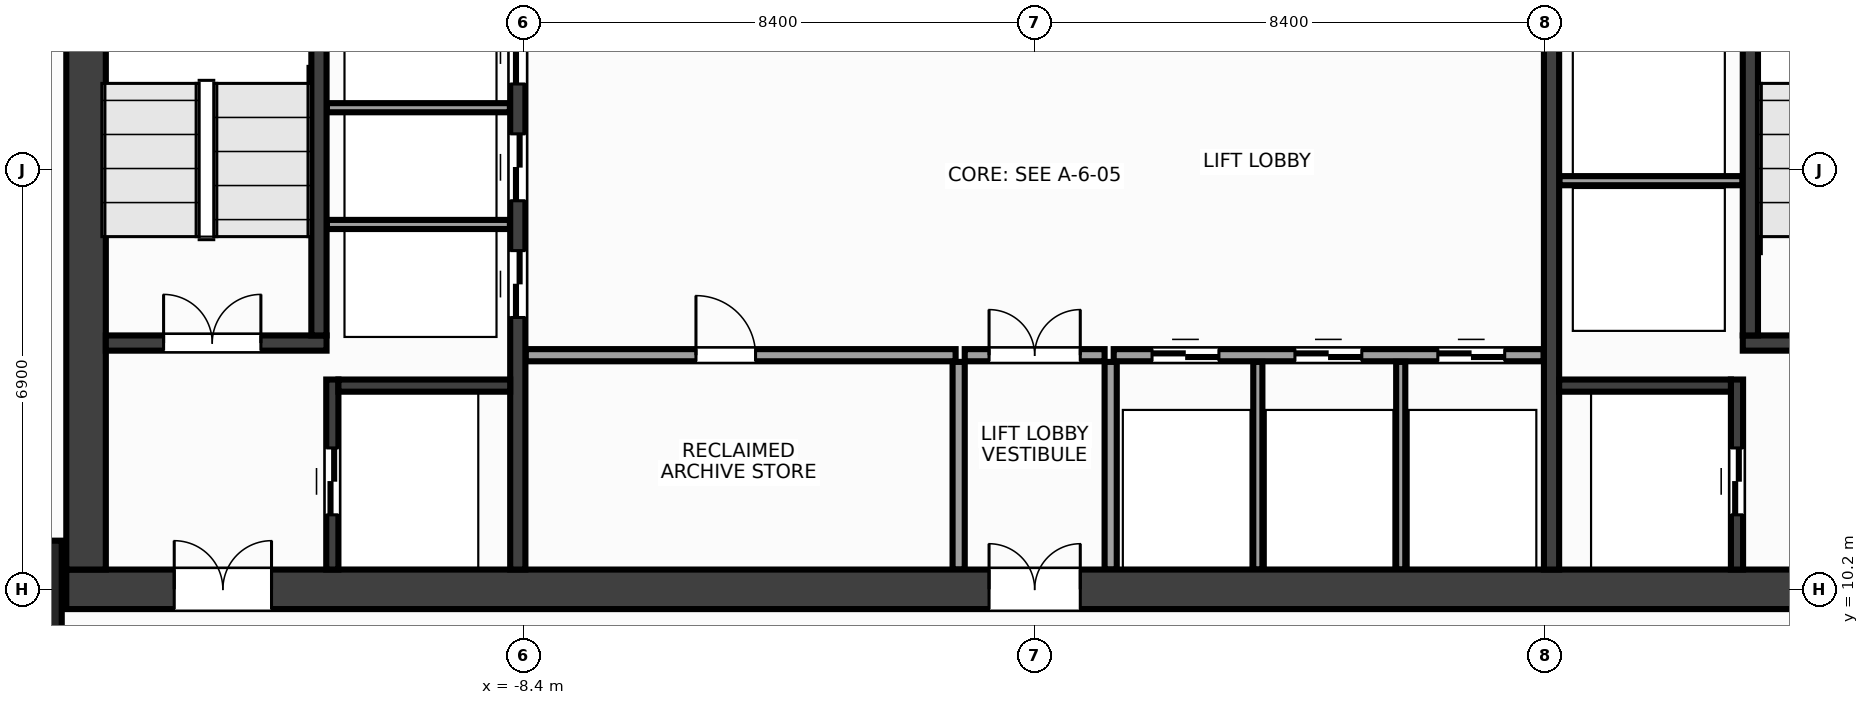
"""IFC4 building model, lengths in metres.
Left out: names, types, materials, properties, quantities, classifications, styles, units other than length and angle.
Written with IfcOpenShell. Run it as: python <this file> out.ifc"""

import sys

from ifc_helpers import new_model, si_unit, direction, frame, frame_2d, origin, origin_2d, place, context, subcontext, project, spatial, rectangle, extrude, source, transform, mapped, element, fill, save


model = new_model("IFC4")
c1 = context("Model", 3, precision=1e-05, world=origin(), true_north=direction((0.0, 1.0)))
c2 = subcontext(c1, "Body", "Model", "MODEL_VIEW")
j1 = project(units=[si_unit("LENGTHUNIT", "METRE"), si_unit("PLANEANGLEUNIT", "RADIAN")], contexts=[c1])
p1 = place(None, origin())
s1 = spatial("IfcSite", under=j1, at=p1, CompositionType="ELEMENT")
p2 = place(p1, origin())
s2 = spatial("IfcBuilding", under=s1, at=p2, CompositionType="ELEMENT")
p3 = place(p2, frame((0.0, 0.0, 153.2)))
s3 = spatial("IfcBuildingStorey", under=s2, at=p3, CompositionType="ELEMENT", Elevation=153.2)
m1 = source(origin(), c2, "Body", "SweptSolid", [
    extrude(rectangle(XDim=31.85, YDim=0.65, at=frame_2d((15.925, 0.0))), origin(), (0.0, 0.0, 1.0), 3.6),
])
p4 = place(p3, frame((-15.925, 10.2, 0.0), z_axis=(0.0, 0.0, 1.0), x_axis=(1.0, 0.0, 0.0)))
e1 = element("IfcWall", 1, at=p4, inside=s3, PredefinedType="SHEAR", context=c2, shape_type="MappedRepresentation", body=[
    mapped(m1, transform((0.0, 0.0, 0.0), x_axis=(1.0, 0.0, 0.0), y_axis=(0.0, 1.0, 0.0), z_axis=(0.0, 0.0, 1.0), scale=1.0)),
])
p5 = place(p4, frame((1.775, 0.0, 0.0)))
e2 = element("IfcOpeningElement", 2, at=p5, cuts=e1, PredefinedType="OPENING", context=c2, shape_type="SweptSolid", body=[
    extrude(rectangle(XDim=1.6, YDim=2.15, at=frame_2d((0.8, 1.075))), frame((0.0, 0.337, 0.0), z_axis=(0.0, -1.0, 0.0), x_axis=(1.0, 0.0, 0.0)), (0.0, 0.0, 1.0), 0.674),
])
p6 = place(p4, frame((28.475, 0.0, 0.0)))
e3 = element("IfcOpeningElement", 3, at=p6, cuts=e1, PredefinedType="OPENING", context=c2, shape_type="SweptSolid", body=[
    extrude(rectangle(XDim=1.6, YDim=2.15, at=frame_2d((0.8, 1.075))), frame((0.0, 0.337, 0.0), z_axis=(0.0, -1.0, 0.0), x_axis=(1.0, 0.0, 0.0)), (0.0, 0.0, 1.0), 0.674),
])
p7 = place(p4, frame((15.175, 0.0, 0.0)))
e4 = element("IfcOpeningElement", 4, at=p7, cuts=e1, PredefinedType="OPENING", context=c2, shape_type="SweptSolid", body=[
    extrude(rectangle(XDim=1.5, YDim=2.2, at=frame_2d((0.75, 1.1))), frame((0.0, 0.337, 0.0), z_axis=(0.0, -1.0, 0.0), x_axis=(1.0, 0.0, 0.0)), (0.0, 0.0, 1.0), 0.674),
])
m2 = source(origin(), c2, "Body", "SweptSolid", [
    extrude(rectangle(XDim=12.95, YDim=0.65, at=frame_2d((6.475, 0.0))), origin(), (0.0, 0.0, 1.0), 3.6),
])
p8 = place(p3, frame((-15.6, 10.525, 0.0), z_axis=(0.0, 0.0, 1.0), x_axis=(0.0, 1.0, 0.0)))
e5 = element("IfcWall", 5, at=p8, inside=s3, PredefinedType="SHEAR", context=c2, shape_type="MappedRepresentation", body=[
    mapped(m2, transform((0.0, 0.0, 0.0), x_axis=(1.0, 0.0, 0.0), y_axis=(0.0, 1.0, 0.0), z_axis=(0.0, 0.0, 1.0), scale=1.0)),
])
m3 = source(origin(), c2, "Body", "SweptSolid", [
    extrude(rectangle(XDim=12.95, YDim=0.25, at=frame_2d((6.475, 0.0))), origin(), (0.0, 0.0, 1.0), 3.6),
])
p9 = place(p3, frame((-8.5, 10.525, 0.0), z_axis=(0.0, 0.0, 1.0), x_axis=(0.0, 1.0, 0.0)))
e6 = element("IfcWall", 6, at=p9, inside=s3, PredefinedType="SHEAR", context=c2, shape_type="MappedRepresentation", body=[
    mapped(m3, transform((0.0, 0.0, 0.0), x_axis=(1.0, 0.0, 0.0), y_axis=(0.0, 1.0, 0.0), z_axis=(0.0, 0.0, 1.0), scale=1.0)),
])
p10 = place(p9, frame((4.145, 0.0, 0.0)))
e7 = element("IfcOpeningElement", 7, at=p10, cuts=e6, PredefinedType="OPENING", context=c2, shape_type="SweptSolid", body=[
    extrude(rectangle(XDim=1.1, YDim=2.15, at=frame_2d((0.55, 1.075))), frame((0.0, 0.137, 0.0), z_axis=(0.0, -1.0, 0.0), x_axis=(1.0, 0.0, 0.0)), (0.0, 0.0, 1.0), 0.274),
])
p11 = place(p9, frame((6.065, 0.0, 0.0)))
e8 = element("IfcOpeningElement", 8, at=p11, cuts=e6, PredefinedType="OPENING", context=c2, shape_type="SweptSolid", body=[
    extrude(rectangle(XDim=1.1, YDim=2.15, at=frame_2d((0.55, 1.075))), frame((0.0, 0.137, 0.0), z_axis=(0.0, -1.0, 0.0), x_axis=(1.0, 0.0, 0.0)), (0.0, 0.0, 1.0), 0.274),
])
p12 = place(p9, frame((7.985, 0.0, 0.0)))
e9 = element("IfcOpeningElement", 9, at=p12, cuts=e6, PredefinedType="OPENING", context=c2, shape_type="SweptSolid", body=[
    extrude(rectangle(XDim=1.1, YDim=2.15, at=frame_2d((0.55, 1.075))), frame((0.0, 0.137, 0.0), z_axis=(0.0, -1.0, 0.0), x_axis=(1.0, 0.0, 0.0)), (0.0, 0.0, 1.0), 0.274),
])
p13 = place(p3, frame((8.5, 10.525, 0.0), z_axis=(0.0, 0.0, 1.0), x_axis=(0.0, 1.0, 0.0)))
e10 = element("IfcWall", 10, at=p13, inside=s3, PredefinedType="SHEAR", context=c2, shape_type="MappedRepresentation", body=[
    mapped(m3, transform((0.0, 0.0, 0.0), x_axis=(1.0, 0.0, 0.0), y_axis=(0.0, 1.0, 0.0), z_axis=(0.0, 0.0, 1.0), scale=1.0)),
])
p14 = place(p13, frame((9.925, 0.0, 0.0)))
e11 = element("IfcOpeningElement", 11, at=p14, cuts=e10, PredefinedType="OPENING", context=c2, shape_type="SweptSolid", body=[
    extrude(rectangle(XDim=0.95, YDim=2.15, at=frame_2d((0.475, 1.075))), frame((0.0, 0.137, 0.0), z_axis=(0.0, -1.0, 0.0), x_axis=(1.0, 0.0, 0.0)), (0.0, 0.0, 1.0), 0.274),
])
m4 = source(origin(), c2, "Body", "SweptSolid", [
    extrude(rectangle(XDim=3.63, YDim=0.25, at=frame_2d((1.815, 0.0))), origin(), (0.0, 0.0, 1.0), 3.6),
])
p15 = place(p3, frame((-15.275, 14.25, 0.0), z_axis=(0.0, 0.0, 1.0), x_axis=(1.0, 0.0, 0.0)))
e12 = element("IfcWall", 12, at=p15, inside=s3, PredefinedType="SHEAR", context=c2, shape_type="MappedRepresentation", body=[
    mapped(m4, transform((0.0, 0.0, 0.0), x_axis=(1.0, 0.0, 0.0), y_axis=(0.0, 1.0, 0.0), z_axis=(0.0, 0.0, 1.0), scale=1.0)),
])
p16 = place(p15, frame((0.95, 0.0, 0.0)))
e13 = element("IfcOpeningElement", 13, at=p16, cuts=e12, PredefinedType="OPENING", context=c2, shape_type="SweptSolid", body=[
    extrude(rectangle(XDim=1.6, YDim=2.15, at=frame_2d((0.8, 1.075))), frame((0.0, 0.137, 0.0), z_axis=(0.0, -1.0, 0.0), x_axis=(1.0, 0.0, 0.0)), (0.0, 0.0, 1.0), 0.274),
])
m5 = source(origin(), c2, "Body", "SweptSolid", [
    extrude(rectangle(XDim=9.1, YDim=0.25, at=frame_2d((4.55, 0.0))), origin(), (0.0, 0.0, 1.0), 3.6),
])
p17 = place(p3, frame((-11.77, 14.375, 0.0), z_axis=(0.0, 0.0, 1.0), x_axis=(0.0, 1.0, 0.0)))
e14 = element("IfcWall", 14, at=p17, inside=s3, PredefinedType="SHEAR", context=c2, shape_type="MappedRepresentation", body=[
    mapped(m5, transform((0.0, 0.0, 0.0), x_axis=(1.0, 0.0, 0.0), y_axis=(0.0, 1.0, 0.0), z_axis=(0.0, 0.0, 1.0), scale=1.0)),
])
p18 = place(p3, frame((11.645, 14.25, 0.0), z_axis=(0.0, 0.0, 1.0), x_axis=(1.0, 0.0, 0.0)))
e15 = element("IfcWall", 15, at=p18, inside=s3, PredefinedType="SHEAR", context=c2, shape_type="MappedRepresentation", body=[
    mapped(m4, transform((0.0, 0.0, 0.0), x_axis=(1.0, 0.0, 0.0), y_axis=(0.0, 1.0, 0.0), z_axis=(0.0, 0.0, 1.0), scale=1.0)),
])
p19 = place(p18, frame((0.95, 0.0, 0.0)))
e16 = element("IfcOpeningElement", 16, at=p19, cuts=e15, PredefinedType="OPENING", context=c2, shape_type="SweptSolid", body=[
    extrude(rectangle(XDim=1.6, YDim=2.15, at=frame_2d((0.8, 1.075))), frame((0.0, 0.137, 0.0), z_axis=(0.0, -1.0, 0.0), x_axis=(1.0, 0.0, 0.0)), (0.0, 0.0, 1.0), 0.274),
])
p20 = place(p3, frame((11.77, 14.375, 0.0), z_axis=(0.0, 0.0, 1.0), x_axis=(0.0, 1.0, 0.0)))
e17 = element("IfcWall", 17, at=p20, inside=s3, PredefinedType="SHEAR", context=c2, shape_type="MappedRepresentation", body=[
    mapped(m5, transform((0.0, 0.0, 0.0), x_axis=(1.0, 0.0, 0.0), y_axis=(0.0, 1.0, 0.0), z_axis=(0.0, 0.0, 1.0), scale=1.0)),
])
m6 = source(origin(), c2, "Body", "SweptSolid", [
    extrude(rectangle(XDim=3.125, YDim=0.2, at=frame_2d((1.562, 0.0))), origin(), (0.0, 0.0, 1.0), 3.6),
])
p21 = place(p3, frame((-11.55, 10.525, 0.0), z_axis=(0.0, 0.0, 1.0), x_axis=(0.0, 1.0, 0.0)))
e18 = element("IfcWall", 18, at=p21, inside=s3, PredefinedType="SHEAR", context=c2, shape_type="MappedRepresentation", body=[
    mapped(m6, transform((0.0, 0.0, 0.0), x_axis=(1.0, 0.0, 0.0), y_axis=(0.0, 1.0, 0.0), z_axis=(0.0, 0.0, 1.0), scale=1.0)),
])
p22 = place(p21, frame((0.9, 0.0, 0.0)))
e19 = element("IfcOpeningElement", 19, at=p22, cuts=e18, PredefinedType="OPENING", context=c2, shape_type="SweptSolid", body=[
    extrude(rectangle(XDim=1.1, YDim=2.15, at=frame_2d((0.55, 1.075))), frame((0.0, 0.112, 0.0), z_axis=(0.0, -1.0, 0.0), x_axis=(1.0, 0.0, 0.0)), (0.0, 0.0, 1.0), 0.224),
])
m7 = source(origin(), c2, "Body", "SweptSolid", [
    extrude(rectangle(XDim=2.825, YDim=0.2, at=frame_2d((1.413, 0.0))), origin(), (0.0, 0.0, 1.0), 3.6),
])
p23 = place(p3, frame((-11.45, 13.55, 0.0), z_axis=(0.0, 0.0, 1.0), x_axis=(1.0, 0.0, 0.0)))
e20 = element("IfcWall", 20, at=p23, inside=s3, PredefinedType="SHEAR", context=c2, shape_type="MappedRepresentation", body=[
    mapped(m7, transform((0.0, 0.0, 0.0), x_axis=(1.0, 0.0, 0.0), y_axis=(0.0, 1.0, 0.0), z_axis=(0.0, 0.0, 1.0), scale=1.0)),
])
p24 = place(p3, frame((11.55, 10.525, 0.0), z_axis=(0.0, 0.0, 1.0), x_axis=(0.0, 1.0, 0.0)))
e21 = element("IfcWall", 21, at=p24, inside=s3, PredefinedType="SHEAR", context=c2, shape_type="MappedRepresentation", body=[
    mapped(m6, transform((0.0, 0.0, 0.0), x_axis=(1.0, 0.0, 0.0), y_axis=(0.0, 1.0, 0.0), z_axis=(0.0, 0.0, 1.0), scale=1.0)),
])
p25 = place(p24, frame((0.9, 0.0, 0.0)))
e22 = element("IfcOpeningElement", 22, at=p25, cuts=e21, PredefinedType="OPENING", context=c2, shape_type="SweptSolid", body=[
    extrude(rectangle(XDim=1.1, YDim=2.15, at=frame_2d((0.55, 1.075))), frame((0.0, 0.112, 0.0), z_axis=(0.0, -1.0, 0.0), x_axis=(1.0, 0.0, 0.0)), (0.0, 0.0, 1.0), 0.224),
])
p26 = place(p3, frame((8.625, 13.55, 0.0), z_axis=(0.0, 0.0, 1.0), x_axis=(1.0, 0.0, 0.0)))
e23 = element("IfcWall", 23, at=p26, inside=s3, PredefinedType="SHEAR", context=c2, shape_type="MappedRepresentation", body=[
    mapped(m7, transform((0.0, 0.0, 0.0), x_axis=(1.0, 0.0, 0.0), y_axis=(0.0, 1.0, 0.0), z_axis=(0.0, 0.0, 1.0), scale=1.0)),
])
m8 = source(origin(), c2, "Body", "SweptSolid", [
    extrude(rectangle(XDim=1.6, YDim=1.6, at=origin_2d()), origin(), (0.0, 0.0, 1.0), 3.6),
])
p27 = place(p3, frame((-16.8, 10.2, 0.0), z_axis=(0.0, 0.0, 1.0), x_axis=(1.0, 0.0, 0.0)))
e24 = element("IfcColumn", 24, at=p27, inside=s3, PredefinedType="COLUMN", context=c2, shape_type="MappedRepresentation", body=[
    mapped(m8, transform((0.0, 0.0, 0.0), x_axis=(1.0, 0.0, 0.0), y_axis=(0.0, 1.0, 0.0), z_axis=(0.0, 0.0, 1.0), scale=1.0)),
])
m9 = source(origin(), c2, "Body", "SweptSolid", [
    extrude(rectangle(XDim=3.01, YDim=0.15, at=frame_2d((1.505, 0.0))), origin(), (0.0, 0.0, 1.0), 3.38),
])
for number, where, z_axis, x_axis in (
    (25, (-11.64, 16.2, 0.0), (0.0, 0.0, 1.0), (1.0, 0.0, 0.0)),
    (26, (-11.64, 18.12, 0.0), (0.0, 0.0, 1.0), (1.0, 0.0, 0.0)),
    (27, (8.63, 16.92, 0.0), (0.0, 0.0, 1.0), (1.0, 0.0, 0.0)),
):
    element("IfcWall", number, at=place(p3, frame(where, z_axis=z_axis, x_axis=x_axis)), inside=s3, PredefinedType="PARTITIONING", context=c2, shape_type="MappedRepresentation", body=[
        mapped(m9, transform((0.0, 0.0, 0.0), x_axis=(1.0, 0.0, 0.0), y_axis=(0.0, 1.0, 0.0), z_axis=(0.0, 0.0, 1.0), scale=1.0)),
    ])
m10 = source(origin(), c2, "Body", "SweptSolid", [
    extrude(rectangle(XDim=7.07, YDim=0.2, at=frame_2d((3.535, 0.0))), origin(), (0.0, 0.0, 1.0), 3.38),
])
p28 = place(p3, frame((-8.37, 14.05, 0.0), z_axis=(0.0, 0.0, 1.0), x_axis=(1.0, 0.0, 0.0)))
e28 = element("IfcWall", 28, at=p28, inside=s3, PredefinedType="PARTITIONING", context=c2, shape_type="MappedRepresentation", body=[
    mapped(m10, transform((0.0, 0.0, 0.0), x_axis=(1.0, 0.0, 0.0), y_axis=(0.0, 1.0, 0.0), z_axis=(0.0, 0.0, 1.0), scale=1.0)),
])
p29 = place(p28, frame((2.8, 0.0, 0.0)))
e29 = element("IfcOpeningElement", 29, at=p29, cuts=e28, PredefinedType="OPENING", context=c2, shape_type="SweptSolid", body=[
    extrude(rectangle(XDim=0.98, YDim=2.15, at=frame_2d((0.49, 1.075))), frame((0.0, 0.112, 0.0), z_axis=(0.0, -1.0, 0.0), x_axis=(1.0, 0.0, 0.0)), (0.0, 0.0, 1.0), 0.224),
])
p30 = place(p3, frame((1.3, 14.05, 0.0), z_axis=(0.0, 0.0, 1.0), x_axis=(1.0, 0.0, 0.0)))
e30 = element("IfcWall", 30, at=p30, inside=s3, PredefinedType="PARTITIONING", context=c2, shape_type="MappedRepresentation", body=[
    mapped(m10, transform((0.0, 0.0, 0.0), x_axis=(1.0, 0.0, 0.0), y_axis=(0.0, 1.0, 0.0), z_axis=(0.0, 0.0, 1.0), scale=1.0)),
])
p31 = place(p30, frame((0.63, 0.0, 0.0)))
e31 = element("IfcOpeningElement", 31, at=p31, cuts=e30, PredefinedType="OPENING", context=c2, shape_type="SweptSolid", body=[
    extrude(rectangle(XDim=1.1, YDim=2.15, at=frame_2d((0.55, 1.075))), frame((0.0, 0.112, 0.0), z_axis=(0.0, -1.0, 0.0), x_axis=(1.0, 0.0, 0.0)), (0.0, 0.0, 1.0), 0.224),
])
p32 = place(p30, frame((2.98, 0.0, 0.0)))
e32 = element("IfcOpeningElement", 32, at=p32, cuts=e30, PredefinedType="OPENING", context=c2, shape_type="SweptSolid", body=[
    extrude(rectangle(XDim=1.1, YDim=2.15, at=frame_2d((0.55, 1.075))), frame((0.0, 0.112, 0.0), z_axis=(0.0, -1.0, 0.0), x_axis=(1.0, 0.0, 0.0)), (0.0, 0.0, 1.0), 0.224),
])
p33 = place(p30, frame((5.33, 0.0, 0.0)))
e33 = element("IfcOpeningElement", 33, at=p33, cuts=e30, PredefinedType="OPENING", context=c2, shape_type="SweptSolid", body=[
    extrude(rectangle(XDim=1.1, YDim=2.15, at=frame_2d((0.55, 1.075))), frame((0.0, 0.112, 0.0), z_axis=(0.0, -1.0, 0.0), x_axis=(1.0, 0.0, 0.0)), (0.0, 0.0, 1.0), 0.224),
])
m11 = source(origin(), c2, "Body", "SweptSolid", [
    extrude(rectangle(XDim=3.415, YDim=0.2, at=frame_2d((1.708, 0.0))), origin(), (0.0, 0.0, 1.0), 3.38),
])
for number, where, z_axis, x_axis in (
    (34, (-1.25, 10.525, 0.0), (0.0, 0.0, 1.0), (0.0, 1.0, 0.0)),
    (35, (1.25, 10.525, 0.0), (0.0, 0.0, 1.0), (0.0, 1.0, 0.0)),
):
    element("IfcWall", number, at=place(p3, frame(where, z_axis=z_axis, x_axis=x_axis)), inside=s3, PredefinedType="PARTITIONING", context=c2, shape_type="MappedRepresentation", body=[
        mapped(m11, transform((0.0, 0.0, 0.0), x_axis=(1.0, 0.0, 0.0), y_axis=(0.0, 1.0, 0.0), z_axis=(0.0, 0.0, 1.0), scale=1.0)),
    ])
m12 = source(origin(), c2, "Body", "SweptSolid", [
    extrude(rectangle(XDim=2.3, YDim=0.2, at=frame_2d((1.15, 0.0))), origin(), (0.0, 0.0, 1.0), 3.38),
])
p34 = place(p3, frame((-1.15, 14.05, 0.0), z_axis=(0.0, 0.0, 1.0), x_axis=(1.0, 0.0, 0.0)))
e36 = element("IfcWall", 36, at=p34, inside=s3, PredefinedType="PARTITIONING", context=c2, shape_type="MappedRepresentation", body=[
    mapped(m12, transform((0.0, 0.0, 0.0), x_axis=(1.0, 0.0, 0.0), y_axis=(0.0, 1.0, 0.0), z_axis=(0.0, 0.0, 1.0), scale=1.0)),
])
p35 = place(p34, frame((0.4, 0.0, 0.0)))
e37 = element("IfcOpeningElement", 37, at=p35, cuts=e36, PredefinedType="OPENING", context=c2, shape_type="SweptSolid", body=[
    extrude(rectangle(XDim=1.5, YDim=2.2, at=frame_2d((0.75, 1.1))), frame((0.0, 0.112, 0.0), z_axis=(0.0, -1.0, 0.0), x_axis=(1.0, 0.0, 0.0)), (0.0, 0.0, 1.0), 0.224),
])
m13 = source(origin(), c2, "Body", "SweptSolid", [
    extrude(rectangle(XDim=3.415, YDim=0.15, at=frame_2d((1.708, 0.0))), origin(), (0.0, 0.0, 1.0), 3.38),
])
for number, where, z_axis, x_axis in (
    (38, (3.67, 10.525, 0.0), (0.0, 0.0, 1.0), (0.0, 1.0, 0.0)),
    (39, (6.02, 10.525, 0.0), (0.0, 0.0, 1.0), (0.0, 1.0, 0.0)),
):
    element("IfcWall", number, at=place(p3, frame(where, z_axis=z_axis, x_axis=x_axis)), inside=s3, PredefinedType="PARTITIONING", context=c2, shape_type="MappedRepresentation", body=[
        mapped(m13, transform((0.0, 0.0, 0.0), x_axis=(1.0, 0.0, 0.0), y_axis=(0.0, 1.0, 0.0), z_axis=(0.0, 0.0, 1.0), scale=1.0)),
    ])
m14 = source(origin(), c2, "Body", "SweptSolid", [
    extrude(rectangle(XDim=1.6, YDim=2.15, at=frame_2d((0.8, 1.075))), frame((0.0, 0.025, 0.0), z_axis=(0.0, -1.0, 0.0), x_axis=(1.0, 0.0, 0.0)), (0.0, 0.0, 1.0), 0.05),
])
p36 = place(p16, origin())
e40 = element("IfcDoor", 40, at=p36, inside=s3, OperationType="DOUBLE_DOOR_SINGLE_SWING", PredefinedType="DOOR", context=c2, shape_type="MappedRepresentation", body=[
    mapped(m14, transform((0.0, 0.0, 0.0), x_axis=(1.0, 0.0, 0.0), y_axis=(0.0, 1.0, 0.0), z_axis=(0.0, 0.0, 1.0), scale=1.0)),
])
fill(e13, e40)
p37 = place(p5, origin())
e41 = element("IfcDoor", 41, at=p37, inside=s3, OperationType="DOUBLE_DOOR_SINGLE_SWING", PredefinedType="DOOR", context=c2, shape_type="MappedRepresentation", body=[
    mapped(m14, transform((0.0, 0.0, 0.0), x_axis=(1.0, 0.0, 0.0), y_axis=(0.0, 1.0, 0.0), z_axis=(0.0, 0.0, 1.0), scale=1.0)),
])
fill(e2, e41)
m15 = source(origin(), c2, "Body", "SweptSolid", [
    extrude(rectangle(XDim=1.1, YDim=2.15, at=frame_2d((0.55, 1.075))), frame((0.0, 0.025, 0.0), z_axis=(0.0, -1.0, 0.0), x_axis=(1.0, 0.0, 0.0)), (0.0, 0.0, 1.0), 0.05),
])
p38 = place(p22, origin())
e42 = element("IfcDoor", 42, at=p38, inside=s3, OperationType="DOUBLE_DOOR_SLIDING", PredefinedType="DOOR", context=c2, shape_type="MappedRepresentation", body=[
    mapped(m15, transform((0.0, 0.0, 0.0), x_axis=(1.0, 0.0, 0.0), y_axis=(0.0, 1.0, 0.0), z_axis=(0.0, 0.0, 1.0), scale=1.0)),
])
fill(e19, e42)
p39 = place(p25, origin())
e43 = element("IfcDoor", 43, at=p39, inside=s3, OperationType="DOUBLE_DOOR_SLIDING", PredefinedType="DOOR", context=c2, shape_type="MappedRepresentation", body=[
    mapped(m15, transform((0.0, 0.0, 0.0), x_axis=(1.0, 0.0, 0.0), y_axis=(0.0, 1.0, 0.0), z_axis=(0.0, 0.0, 1.0), scale=1.0)),
])
fill(e22, e43)
p40 = place(p10, origin())
e44 = element("IfcDoor", 44, at=p40, inside=s3, OperationType="DOUBLE_DOOR_SLIDING", PredefinedType="DOOR", context=c2, shape_type="MappedRepresentation", body=[
    mapped(m15, transform((0.0, 0.0, 0.0), x_axis=(1.0, 0.0, 0.0), y_axis=(0.0, 1.0, 0.0), z_axis=(0.0, 0.0, 1.0), scale=1.0)),
])
fill(e7, e44)
p41 = place(p11, origin())
e45 = element("IfcDoor", 45, at=p41, inside=s3, OperationType="DOUBLE_DOOR_SLIDING", PredefinedType="DOOR", context=c2, shape_type="MappedRepresentation", body=[
    mapped(m15, transform((0.0, 0.0, 0.0), x_axis=(1.0, 0.0, 0.0), y_axis=(0.0, 1.0, 0.0), z_axis=(0.0, 0.0, 1.0), scale=1.0)),
])
fill(e8, e45)
p42 = place(p12, origin())
e46 = element("IfcDoor", 46, at=p42, inside=s3, OperationType="DOUBLE_DOOR_SLIDING", PredefinedType="DOOR", context=c2, shape_type="MappedRepresentation", body=[
    mapped(m15, transform((0.0, 0.0, 0.0), x_axis=(1.0, 0.0, 0.0), y_axis=(0.0, 1.0, 0.0), z_axis=(0.0, 0.0, 1.0), scale=1.0)),
])
fill(e9, e46)
m16 = source(origin(), c2, "Body", "SweptSolid", [
    extrude(rectangle(XDim=0.98, YDim=2.15, at=frame_2d((0.49, 1.075))), frame((0.0, 0.025, 0.0), z_axis=(0.0, -1.0, 0.0), x_axis=(1.0, 0.0, 0.0)), (0.0, 0.0, 1.0), 0.05),
])
p43 = place(p29, origin())
e47 = element("IfcDoor", 47, at=p43, inside=s3, OperationType="SINGLE_SWING_LEFT", PredefinedType="DOOR", context=c2, shape_type="MappedRepresentation", body=[
    mapped(m16, transform((0.0, 0.0, 0.0), x_axis=(1.0, 0.0, 0.0), y_axis=(0.0, 1.0, 0.0), z_axis=(0.0, 0.0, 1.0), scale=1.0)),
])
fill(e29, e47)
p44 = place(p31, origin())
e48 = element("IfcDoor", 48, at=p44, inside=s3, OperationType="DOUBLE_DOOR_SLIDING", PredefinedType="DOOR", context=c2, shape_type="MappedRepresentation", body=[
    mapped(m15, transform((0.0, 0.0, 0.0), x_axis=(1.0, 0.0, 0.0), y_axis=(0.0, 1.0, 0.0), z_axis=(0.0, 0.0, 1.0), scale=1.0)),
])
fill(e31, e48)
p45 = place(p32, origin())
e49 = element("IfcDoor", 49, at=p45, inside=s3, OperationType="DOUBLE_DOOR_SLIDING", PredefinedType="DOOR", context=c2, shape_type="MappedRepresentation", body=[
    mapped(m15, transform((0.0, 0.0, 0.0), x_axis=(1.0, 0.0, 0.0), y_axis=(0.0, 1.0, 0.0), z_axis=(0.0, 0.0, 1.0), scale=1.0)),
])
fill(e32, e49)
p46 = place(p33, origin())
e50 = element("IfcDoor", 50, at=p46, inside=s3, OperationType="DOUBLE_DOOR_SLIDING", PredefinedType="DOOR", context=c2, shape_type="MappedRepresentation", body=[
    mapped(m15, transform((0.0, 0.0, 0.0), x_axis=(1.0, 0.0, 0.0), y_axis=(0.0, 1.0, 0.0), z_axis=(0.0, 0.0, 1.0), scale=1.0)),
])
fill(e33, e50)
m17 = source(origin(), c2, "Body", "SweptSolid", [
    extrude(rectangle(XDim=1.5, YDim=2.2, at=frame_2d((0.75, 1.1))), frame((0.0, 0.025, 0.0), z_axis=(0.0, -1.0, 0.0), x_axis=(1.0, 0.0, 0.0)), (0.0, 0.0, 1.0), 0.05),
])
p47 = place(p35, origin())
e51 = element("IfcDoor", 51, at=p47, inside=s3, OperationType="DOUBLE_DOOR_SINGLE_SWING", PredefinedType="DOOR", context=c2, shape_type="MappedRepresentation", body=[
    mapped(m17, transform((0.0, 0.0, 0.0), x_axis=(1.0, 0.0, 0.0), y_axis=(0.0, 1.0, 0.0), z_axis=(0.0, 0.0, 1.0), scale=1.0)),
])
fill(e37, e51)
p48 = place(p7, origin())
e52 = element("IfcDoor", 52, at=p48, inside=s3, OperationType="DOUBLE_DOOR_SINGLE_SWING", PredefinedType="DOOR", context=c2, shape_type="MappedRepresentation", body=[
    mapped(m17, transform((0.0, 0.0, 0.0), x_axis=(1.0, 0.0, 0.0), y_axis=(0.0, 1.0, 0.0), z_axis=(0.0, 0.0, 1.0), scale=1.0)),
])
fill(e4, e52)
save(model, sys.argv[1])
